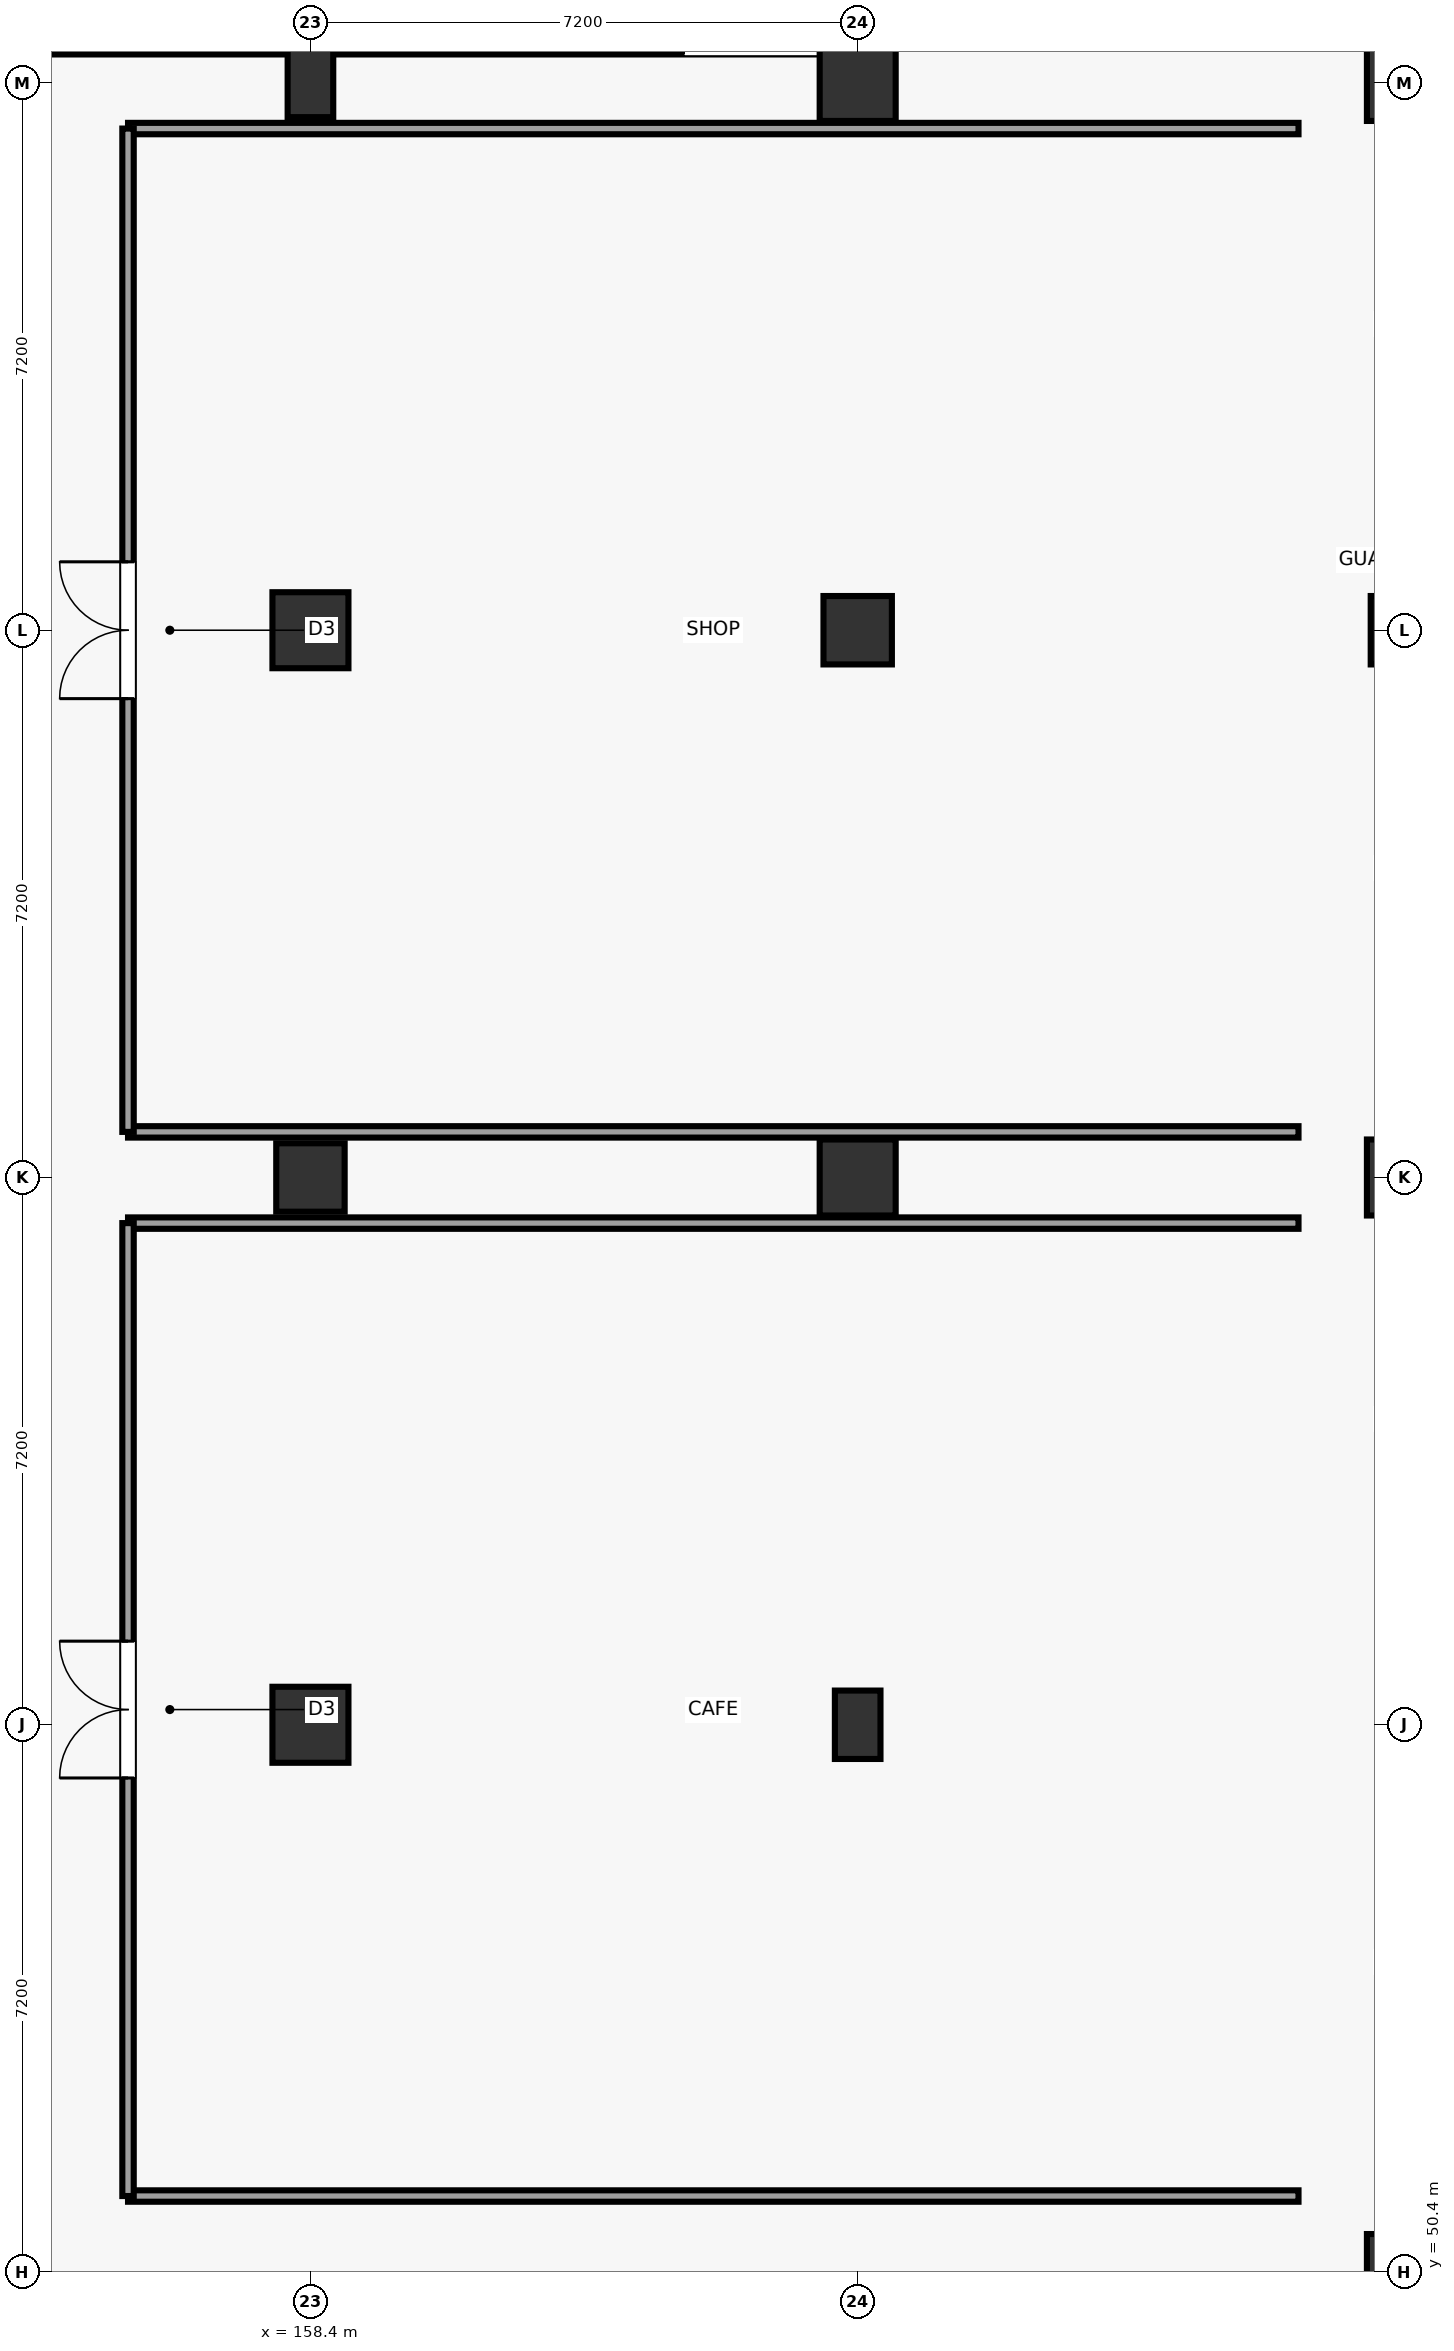
"""IFC4 building model, lengths in metres.
Left out: names, types, materials, properties, quantities, classifications, styles, units other than length and angle.
Written with IfcOpenShell. Run it as: python <this file> out.ifc"""

import sys

from ifc_helpers import new_model, si_unit, direction, frame, frame_2d, origin, origin_2d, place, context, subcontext, project, spatial, rectangle, circle, extrude, element, fill, save


model = new_model("IFC4")
c1 = context("Model", 3, precision=1e-05, world=origin(), true_north=direction((0.0, 1.0)))
c2 = subcontext(c1, "Body", "Model", "MODEL_VIEW")
j1 = project(units=[si_unit("LENGTHUNIT", "METRE"), si_unit("PLANEANGLEUNIT", "RADIAN")], contexts=[c1])
p1 = place(None, origin())
s1 = spatial("IfcSite", under=j1, at=p1, CompositionType="ELEMENT")
p2 = place(p1, origin())
s2 = spatial("IfcBuilding", under=s1, at=p2, CompositionType="ELEMENT")
p3 = place(p2, origin())
s3 = spatial("IfcBuildingStorey", under=s2, at=p3, CompositionType="ELEMENT", Elevation=0.0)
p4 = place(p3, frame((158.4, 57.6, 0.0), z_axis=(0.0, 0.0, 1.0), x_axis=(1.0, 0.0, 0.0)))
e1 = element("IfcColumn", 1, at=p4, inside=s3, PredefinedType="COLUMN", context=c2, shape_type="SweptSolid", body=[
    extrude(rectangle(XDim=1.0, YDim=1.0, at=origin_2d()), origin(), (0.0, 0.0, 1.0), 5.4),
])
p5 = place(p3, frame((158.4, 64.8, 0.0), z_axis=(0.0, 0.0, 1.0), x_axis=(1.0, 0.0, 0.0)))
e2 = element("IfcColumn", 2, at=p5, inside=s3, PredefinedType="COLUMN", context=c2, shape_type="SweptSolid", body=[
    extrude(rectangle(XDim=0.9, YDim=0.9, at=origin_2d()), origin(), (0.0, 0.0, 1.0), 5.4),
])
p6 = place(p3, frame((158.4, 72.0, 0.0), z_axis=(0.0, 0.0, 1.0), x_axis=(1.0, 0.0, 0.0)))
e3 = element("IfcColumn", 3, at=p6, inside=s3, PredefinedType="COLUMN", context=c2, shape_type="SweptSolid", body=[
    extrude(circle(Radius=0.5, at=origin_2d()), origin(), (0.0, 0.0, 1.0), 5.4),
])
for number, where, z_axis, x_axis in (
    (4, (158.4, 79.2, 0.0), (0.0, 0.0, 1.0), (1.0, 0.0, 0.0)),
    (5, (165.6, 57.6, 0.0), (0.0, 0.0, 1.0), (1.0, 0.0, 0.0)),
):
    element("IfcColumn", number, at=place(p3, frame(where, z_axis=z_axis, x_axis=x_axis)), inside=s3, PredefinedType="COLUMN", context=c2, shape_type="SweptSolid", body=[
        extrude(rectangle(XDim=0.6, YDim=0.9, at=origin_2d()), origin(), (0.0, 0.0, 1.0), 5.4),
    ])
p7 = place(p3, frame((165.6, 64.8, 0.0), z_axis=(0.0, 0.0, 1.0), x_axis=(1.0, 0.0, 0.0)))
e6 = element("IfcColumn", 6, at=p7, inside=s3, PredefinedType="COLUMN", context=c2, shape_type="SweptSolid", body=[
    extrude(rectangle(XDim=1.0, YDim=1.0, at=origin_2d()), origin(), (0.0, 0.0, 1.0), 5.4),
])
p8 = place(p3, frame((165.6, 72.0, 0.0), z_axis=(0.0, 0.0, 1.0), x_axis=(1.0, 0.0, 0.0)))
e7 = element("IfcColumn", 7, at=p8, inside=s3, PredefinedType="COLUMN", context=c2, shape_type="SweptSolid", body=[
    extrude(rectangle(XDim=0.9, YDim=0.9, at=origin_2d()), origin(), (0.0, 0.0, 1.0), 5.4),
])
for number, where, z_axis, x_axis in (
    (8, (165.6, 79.2, 0.0), (0.0, 0.0, 1.0), (1.0, 0.0, 0.0)),
    (9, (172.8, 50.4, 0.0), (0.0, 0.0, 1.0), (1.0, 0.0, 0.0)),
):
    element("IfcColumn", number, at=place(p3, frame(where, z_axis=z_axis, x_axis=x_axis)), inside=s3, PredefinedType="COLUMN", context=c2, shape_type="SweptSolid", body=[
        extrude(circle(Radius=0.5, at=origin_2d()), origin(), (0.0, 0.0, 1.0), 5.4),
    ])
p9 = place(p3, frame((172.8, 64.8, 0.0), z_axis=(0.0, 0.0, 1.0), x_axis=(1.0, 0.0, 0.0)))
e10 = element("IfcColumn", 10, at=p9, inside=s3, PredefinedType="COLUMN", context=c2, shape_type="SweptSolid", body=[
    extrude(rectangle(XDim=1.0, YDim=1.0, at=origin_2d()), origin(), (0.0, 0.0, 1.0), 5.4),
])
p10 = place(p3, frame((172.8, 72.0, 0.0), z_axis=(0.0, 0.0, 1.0), x_axis=(1.0, 0.0, 0.0)))
e11 = element("IfcColumn", 11, at=p10, inside=s3, PredefinedType="COLUMN", context=c2, shape_type="SweptSolid", body=[
    extrude(rectangle(XDim=0.9, YDim=0.9, at=origin_2d()), origin(), (0.0, 0.0, 1.0), 5.4),
])
p11 = place(p3, frame((172.8, 79.2, 0.0), z_axis=(0.0, 0.0, 1.0), x_axis=(1.0, 0.0, 0.0)))
e12 = element("IfcColumn", 12, at=p11, inside=s3, PredefinedType="COLUMN", context=c2, shape_type="SweptSolid", body=[
    extrude(circle(Radius=0.5, at=origin_2d()), origin(), (0.0, 0.0, 1.0), 5.4),
])
p12 = place(p3, frame((153.2, 79.8, 0.0), z_axis=(0.0, 0.0, 1.0), x_axis=(1.0, 0.0, 0.0)))
e13 = element("IfcWall", 13, at=p12, inside=s3, PredefinedType="SHEAR", context=c2, shape_type="SweptSolid", body=[
    extrude(rectangle(XDim=12.8, YDim=0.45, at=frame_2d((6.4, 0.0))), origin(), (0.0, 0.0, 1.0), 5.06),
])
p13 = place(p12, frame((0.55, 0.0, 0.0)))
e14 = element("IfcOpeningElement", 14, at=p13, cuts=e13, PredefinedType="OPENING", context=c2, shape_type="SweptSolid", body=[
    extrude(rectangle(XDim=1.2, YDim=2.25, at=frame_2d((0.6, 1.125))), frame((0.0, 0.235, 0.0), z_axis=(0.0, -1.0, 0.0), x_axis=(1.0, 0.0, 0.0)), (0.0, 0.0, 1.0), 0.47),
])
p14 = place(p12, frame((10.108, 0.0, 0.0)))
e15 = element("IfcOpeningElement", 15, at=p14, cuts=e13, PredefinedType="OPENING", context=c2, shape_type="SweptSolid", body=[
    extrude(rectangle(XDim=1.8, YDim=2.4, at=frame_2d((0.9, 1.2))), frame((0.0, 0.235, 0.0), z_axis=(0.0, -1.0, 0.0), x_axis=(1.0, 0.0, 0.0)), (0.0, 0.0, 1.0), 0.47),
])
for number, where, z_axis, x_axis in (
    (16, (156.0, 51.4, 0.0), (0.0, 0.0, 1.0), (1.0, 0.0, 0.0)),
    (17, (171.4, 64.2, 0.0), (0.0, 0.0, 1.0), (-1.0, 0.0, 0.0)),
):
    element("IfcWall", number, at=place(p3, frame(where, z_axis=z_axis, x_axis=x_axis)), inside=s3, PredefinedType="PARTITIONING", context=c2, shape_type="SweptSolid", body=[
        extrude(rectangle(XDim=15.4, YDim=0.15, at=frame_2d((7.7, 0.0))), origin(), (0.0, 0.0, 1.0), 4.1),
    ])
p15 = place(p3, frame((156.0, 64.2, 0.0), z_axis=(0.0, 0.0, 1.0), x_axis=(0.0, -1.0, 0.0)))
e18 = element("IfcWall", 18, at=p15, inside=s3, PredefinedType="PARTITIONING", context=c2, shape_type="SweptSolid", body=[
    extrude(rectangle(XDim=12.8, YDim=0.15, at=frame_2d((6.4, 0.0))), origin(), (0.0, 0.0, 1.0), 4.1),
])
p16 = place(p15, frame((5.5, 0.0, 0.0)))
e19 = element("IfcOpeningElement", 19, at=p16, cuts=e18, PredefinedType="OPENING", context=c2, shape_type="SweptSolid", body=[
    extrude(rectangle(XDim=1.8, YDim=2.3, at=frame_2d((0.9, 1.15))), frame((0.0, 0.085, 0.0), z_axis=(0.0, -1.0, 0.0), x_axis=(1.0, 0.0, 0.0)), (0.0, 0.0, 1.0), 0.17),
])
for number, where, z_axis, x_axis in (
    (20, (156.0, 65.4, 0.0), (0.0, 0.0, 1.0), (1.0, 0.0, 0.0)),
    (21, (171.4, 78.6, 0.0), (0.0, 0.0, 1.0), (-1.0, 0.0, 0.0)),
):
    element("IfcWall", number, at=place(p3, frame(where, z_axis=z_axis, x_axis=x_axis)), inside=s3, PredefinedType="PARTITIONING", context=c2, shape_type="SweptSolid", body=[
        extrude(rectangle(XDim=15.4, YDim=0.15, at=frame_2d((7.7, 0.0))), origin(), (0.0, 0.0, 1.0), 4.1),
    ])
p17 = place(p3, frame((156.0, 78.6, 0.0), z_axis=(0.0, 0.0, 1.0), x_axis=(0.0, -1.0, 0.0)))
e22 = element("IfcWall", 22, at=p17, inside=s3, PredefinedType="PARTITIONING", context=c2, shape_type="SweptSolid", body=[
    extrude(rectangle(XDim=13.2, YDim=0.15, at=frame_2d((6.6, 0.0))), origin(), (0.0, 0.0, 1.0), 4.1),
])
p18 = place(p17, frame((5.7, 0.0, 0.0)))
e23 = element("IfcOpeningElement", 23, at=p18, cuts=e22, PredefinedType="OPENING", context=c2, shape_type="SweptSolid", body=[
    extrude(rectangle(XDim=1.8, YDim=2.3, at=frame_2d((0.9, 1.15))), frame((0.0, 0.085, 0.0), z_axis=(0.0, -1.0, 0.0), x_axis=(1.0, 0.0, 0.0)), (0.0, 0.0, 1.0), 0.17),
])
p19 = place(p16, frame((1.8, 0.0, 0.0), z_axis=(0.0, 0.0, 1.0), x_axis=(-1.0, 0.0, 0.0)))
e24 = element("IfcDoor", 24, at=p19, inside=s3, OperationType="DOUBLE_DOOR_SINGLE_SWING", PredefinedType="DOOR", context=c2, shape_type="SweptSolid", body=[
    extrude(rectangle(XDim=1.8, YDim=2.3, at=frame_2d((0.9, 1.15))), frame((0.0, 0.025, 0.0), z_axis=(0.0, -1.0, 0.0), x_axis=(1.0, 0.0, 0.0)), (0.0, 0.0, 1.0), 0.05),
])
fill(e19, e24)
p20 = place(p18, frame((1.8, 0.0, 0.0), z_axis=(0.0, 0.0, 1.0), x_axis=(-1.0, 0.0, 0.0)))
e25 = element("IfcDoor", 25, at=p20, inside=s3, OperationType="DOUBLE_DOOR_SINGLE_SWING", PredefinedType="DOOR", context=c2, shape_type="SweptSolid", body=[
    extrude(rectangle(XDim=1.8, YDim=2.3, at=frame_2d((0.9, 1.15))), frame((0.0, 0.025, 0.0), z_axis=(0.0, -1.0, 0.0), x_axis=(1.0, 0.0, 0.0)), (0.0, 0.0, 1.0), 0.05),
])
fill(e23, e25)
save(model, sys.argv[1])
